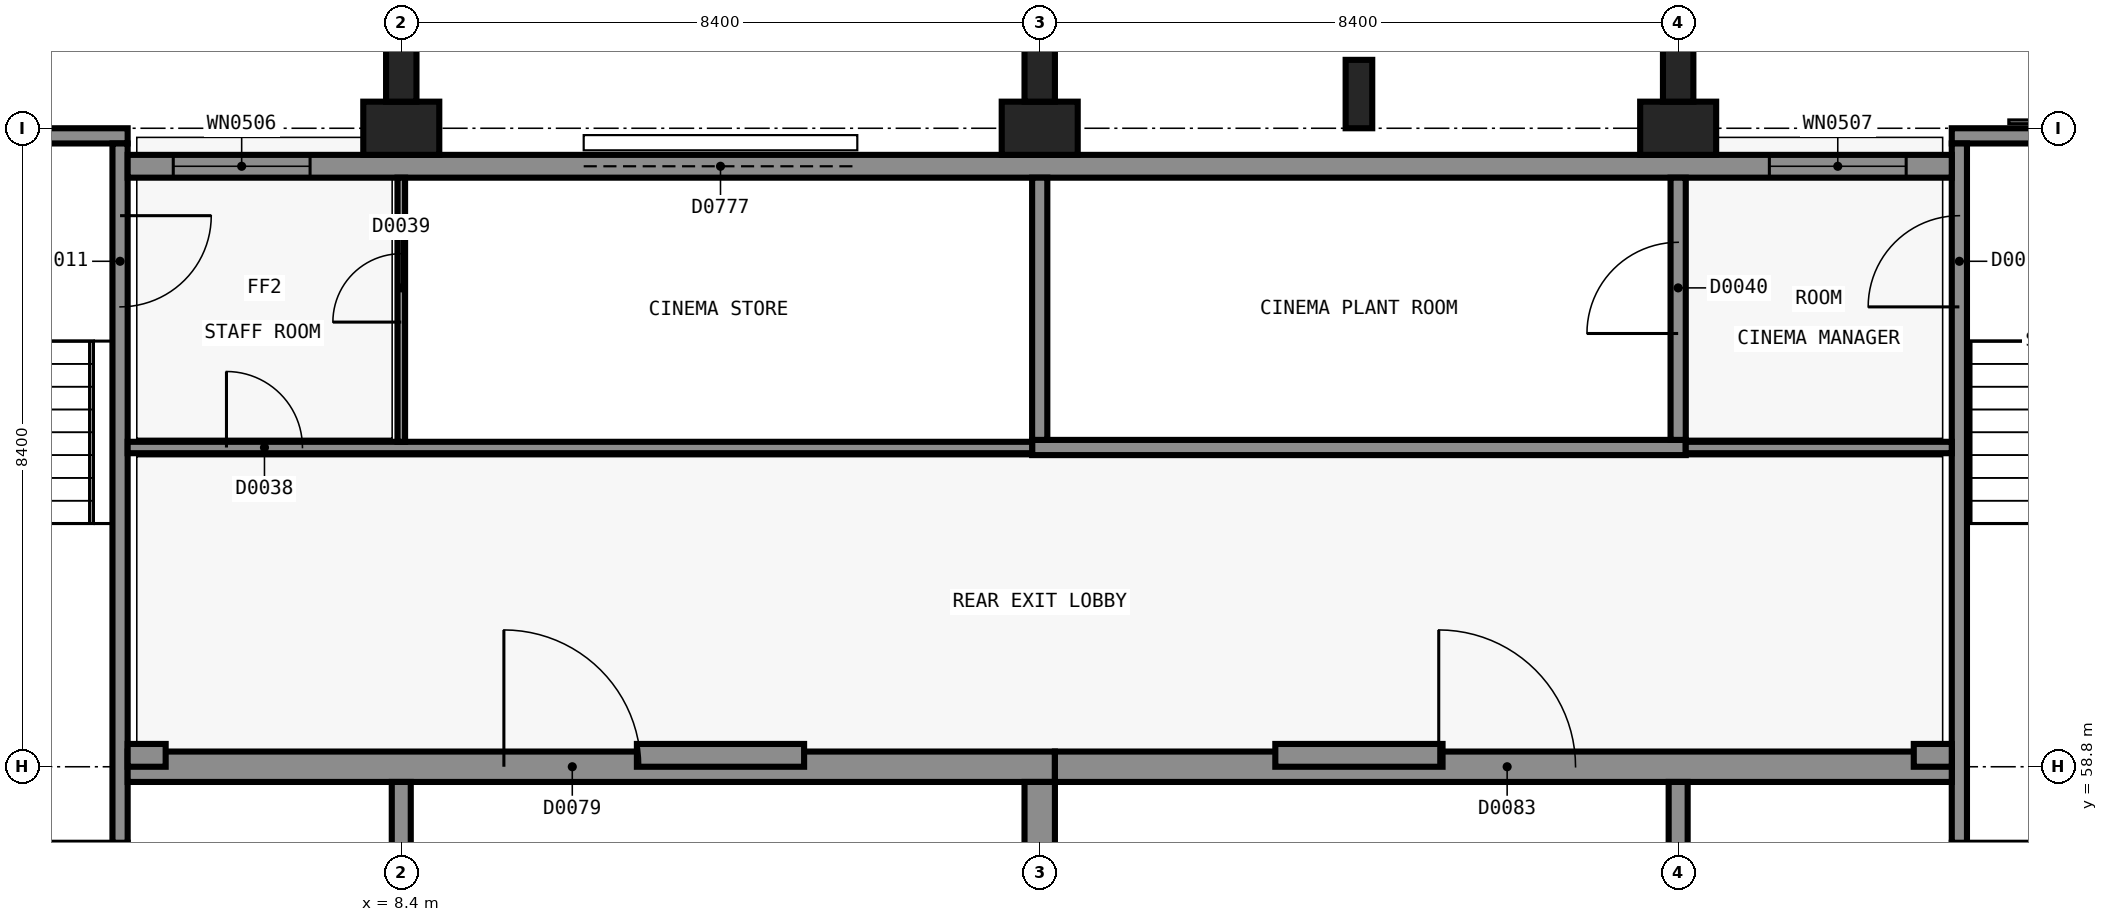
"""IFC4 building model, lengths in metres.
Left out: names, types, materials, properties, quantities, classifications, styles, units other than length and angle.
Written with IfcOpenShell. Run it as: python <this file> out.ifc"""

import sys

from ifc_helpers import new_model, si_unit, direction, frame, frame_2d, origin, origin_2d, place, context, subcontext, project, spatial, polyline, rectangle, outline, extrude, element, fill, save


model = new_model("IFC4")
c1 = context("Model", 3, precision=1e-05, world=origin(), true_north=direction((0.0, 1.0)))
c2 = subcontext(c1, "Body", "Model", "MODEL_VIEW")
j1 = project(units=[si_unit("LENGTHUNIT", "METRE"), si_unit("PLANEANGLEUNIT", "RADIAN")], contexts=[c1])
p1 = place(None, origin())
s1 = spatial("IfcSite", under=j1, at=p1, CompositionType="ELEMENT")
p2 = place(p1, origin())
s2 = spatial("IfcBuilding", under=s1, at=p2, CompositionType="ELEMENT")
p3 = place(p2, origin())
s3 = spatial("IfcBuildingStorey", under=s2, at=p3, CompositionType="ELEMENT", Elevation=0.0)
p4 = place(p3, frame((0.0, 67.1, -0.3), z_axis=(0.0, 0.0, 1.0), x_axis=(1.0, 0.0, 0.0)))
e1 = element("IfcWall", 1, at=p4, inside=s3, PredefinedType="SHEAR", context=c2, shape_type="SweptSolid", body=[
    extrude(rectangle(XDim=4.8, YDim=0.2, at=frame_2d((2.4, 0.0))), origin(), (0.0, 0.0, 1.0), 5.7),
])
p5 = place(p4, frame((1.85, 0.0, 0.0)))
e2 = element("IfcOpeningElement", 2, at=p5, cuts=e1, PredefinedType="OPENING", context=c2, shape_type="SweptSolid", body=[
    extrude(rectangle(XDim=1.1, YDim=2.2, at=frame_2d((0.55, 1.1))), frame((0.0, 0.11, 0.0), z_axis=(0.0, -1.0, 0.0), x_axis=(1.0, 0.0, 0.0)), (0.0, 0.0, 1.0), 0.22),
])
p6 = place(p3, frame((4.7, 67.0, -0.3), z_axis=(0.0, 0.0, 1.0), x_axis=(0.0, -1.0, 0.0)))
e3 = element("IfcWall", 3, at=p6, inside=s3, PredefinedType="SHEAR", context=c2, shape_type="SweptSolid", body=[
    extrude(rectangle(XDim=9.2, YDim=0.2, at=frame_2d((4.6, 0.0))), origin(), (0.0, 0.0, 1.0), 5.7),
])
p7 = place(p6, frame((0.95, 0.0, 0.3)))
e4 = element("IfcOpeningElement", 4, at=p7, cuts=e3, PredefinedType="OPENING", context=c2, shape_type="SweptSolid", body=[
    extrude(rectangle(XDim=1.2, YDim=2.1, at=frame_2d((0.6, 1.05))), frame((0.0, 0.11, 0.0), z_axis=(0.0, -1.0, 0.0), x_axis=(1.0, 0.0, 0.0)), (0.0, 0.0, 1.0), 0.22),
])
p8 = place(p3, frame((28.8, 67.1, -0.3), z_axis=(0.0, 0.0, 1.0), x_axis=(1.0, 0.0, 0.0)))
e5 = element("IfcWall", 5, at=p8, inside=s3, PredefinedType="SHEAR", context=c2, shape_type="SweptSolid", body=[
    extrude(rectangle(XDim=4.8, YDim=0.2, at=frame_2d((2.4, 0.0))), origin(), (0.0, 0.0, 1.0), 5.7),
])
p9 = place(p8, frame((1.85, 0.0, 0.0)))
e6 = element("IfcOpeningElement", 6, at=p9, cuts=e5, PredefinedType="OPENING", context=c2, shape_type="SweptSolid", body=[
    extrude(rectangle(XDim=1.1, YDim=2.2, at=frame_2d((0.55, 1.1))), frame((0.0, 0.11, 0.0), z_axis=(0.0, -1.0, 0.0), x_axis=(1.0, 0.0, 0.0)), (0.0, 0.0, 1.0), 0.22),
])
p10 = place(p3, frame((28.9, 57.8, -0.3), z_axis=(0.0, 0.0, 1.0), x_axis=(0.0, 1.0, 0.0)))
e7 = element("IfcWall", 7, at=p10, inside=s3, PredefinedType="SHEAR", context=c2, shape_type="SweptSolid", body=[
    extrude(rectangle(XDim=9.2, YDim=0.2, at=frame_2d((4.6, 0.0))), origin(), (0.0, 0.0, 1.0), 5.7),
])
p11 = place(p10, frame((7.05, 0.0, 0.3)))
e8 = element("IfcOpeningElement", 8, at=p11, cuts=e7, PredefinedType="OPENING", context=c2, shape_type="SweptSolid", body=[
    extrude(rectangle(XDim=1.2, YDim=2.1, at=frame_2d((0.6, 1.05))), frame((0.0, 0.11, 0.0), z_axis=(0.0, -1.0, 0.0), x_axis=(1.0, 0.0, 0.0)), (0.0, 0.0, 1.0), 0.22),
])
p12 = place(p3, frame((4.8, 58.8, -0.3), z_axis=(0.0, 0.0, 1.0), x_axis=(1.0, 0.0, 0.0)))
e9 = element("IfcWall", 9, at=p12, inside=s3, PredefinedType="SHEAR", context=c2, shape_type="SweptSolid", body=[
    extrude(rectangle(XDim=12.2, YDim=0.4, at=frame_2d((6.1, 0.0))), origin(), (0.0, 0.0, 1.0), 5.7),
])
p13 = place(p12, frame((4.95, 0.0, 0.3)))
e10 = element("IfcOpeningElement", 10, at=p13, cuts=e9, PredefinedType="OPENING", context=c2, shape_type="SweptSolid", body=[
    extrude(rectangle(XDim=1.8, YDim=2.1, at=frame_2d((0.9, 1.05))), frame((0.0, 0.21, 0.0), z_axis=(0.0, -1.0, 0.0), x_axis=(1.0, 0.0, 0.0)), (0.0, 0.0, 1.0), 0.42),
])
p14 = place(p3, frame((16.8, 58.6, -0.3), z_axis=(0.0, 0.0, 1.0), x_axis=(0.0, -1.0, 0.0)))
e11 = element("IfcWall", 11, at=p14, inside=s3, PredefinedType="SHEAR", context=c2, shape_type="SweptSolid", body=[
    extrude(rectangle(XDim=16.4, YDim=0.4, at=frame_2d((8.2, 0.0))), origin(), (0.0, 0.0, 1.0), 5.7),
])
p15 = place(p3, frame((17.0, 58.8, -0.3), z_axis=(0.0, 0.0, 1.0), x_axis=(1.0, 0.0, 0.0)))
e12 = element("IfcWall", 12, at=p15, inside=s3, PredefinedType="SHEAR", context=c2, shape_type="SweptSolid", body=[
    extrude(rectangle(XDim=11.8, YDim=0.4, at=frame_2d((5.9, 0.0))), origin(), (0.0, 0.0, 1.0), 5.7),
])
p16 = place(p15, frame((5.05, 0.0, 0.3)))
e13 = element("IfcOpeningElement", 13, at=p16, cuts=e12, PredefinedType="OPENING", context=c2, shape_type="SweptSolid", body=[
    extrude(rectangle(XDim=1.8, YDim=2.1, at=frame_2d((0.9, 1.05))), frame((0.0, 0.21, 0.0), z_axis=(0.0, -1.0, 0.0), x_axis=(1.0, 0.0, 0.0)), (0.0, 0.0, 1.0), 0.42),
])
for number, where, z_axis, x_axis in (
    (14, (8.4, 43.1, -0.3), (0.0, 0.0, 1.0), (0.0, 1.0, 0.0)),
    (15, (25.2, 43.1, -0.3), (0.0, 0.0, 1.0), (0.0, 1.0, 0.0)),
):
    element("IfcWall", number, at=place(p3, frame(where, z_axis=z_axis, x_axis=x_axis)), inside=s3, PredefinedType="SOLIDWALL", context=c2, shape_type="SweptSolid", body=[
        extrude(outline(polyline([(0.0, 0.0), (15.5, 0.0), (15.5, 2.324), (0.0, 0.154), (0.0, 0.0)])), frame((0.0, 0.125, 0.0), z_axis=(0.0, -1.0, 0.0), x_axis=(1.0, 0.0, 0.0)), (0.0, 0.0, 1.0), 0.25),
    ])
for number, where, z_axis, x_axis in (
    (16, (8.4, 67.2, -0.3), (0.0, 0.0, 1.0), (1.0, 0.0, 0.0)),
    (17, (16.8, 67.2, -0.3), (0.0, 0.0, 1.0), (1.0, 0.0, 0.0)),
    (18, (25.2, 67.2, -0.3), (0.0, 0.0, 1.0), (1.0, 0.0, 0.0)),
):
    element("IfcColumn", number, at=place(p3, frame(where, z_axis=z_axis, x_axis=x_axis)), inside=s3, PredefinedType="COLUMN", context=c2, shape_type="SweptSolid", body=[
        extrude(rectangle(XDim=1.0, YDim=0.7, at=origin_2d()), origin(), (0.0, 0.0, 1.0), 5.7),
    ])
p17 = place(p3, frame((5.3, 58.95, -1.2), z_axis=(0.0, 0.0, 1.0), x_axis=(-1.0, 0.0, 0.0)))
e19 = element("IfcWall", 19, at=p17, inside=s3, PredefinedType="SOLIDWALL", context=c2, shape_type="SweptSolid", body=[
    extrude(rectangle(XDim=0.5, YDim=0.3, at=frame_2d((0.25, 0.0))), origin(), (0.0, 0.0, 1.0), 0.9),
])
p18 = place(p3, frame((13.7, 58.95, -1.2), z_axis=(0.0, 0.0, 1.0), x_axis=(-1.0, 0.0, 0.0)))
e20 = element("IfcWall", 20, at=p18, inside=s3, PredefinedType="SOLIDWALL", context=c2, shape_type="SweptSolid", body=[
    extrude(rectangle(XDim=2.2, YDim=0.3, at=frame_2d((1.1, 0.0))), origin(), (0.0, 0.0, 1.0), 0.9),
])
p19 = place(p3, frame((22.1, 58.95, -1.2), z_axis=(0.0, 0.0, 1.0), x_axis=(-1.0, 0.0, 0.0)))
e21 = element("IfcWall", 21, at=p19, inside=s3, PredefinedType="SOLIDWALL", context=c2, shape_type="SweptSolid", body=[
    extrude(rectangle(XDim=2.2, YDim=0.3, at=frame_2d((1.1, 0.0))), origin(), (0.0, 0.0, 1.0), 0.9),
])
p20 = place(p3, frame((28.8, 58.95, -1.2), z_axis=(0.0, 0.0, 1.0), x_axis=(-1.0, 0.0, 0.0)))
e22 = element("IfcWall", 22, at=p20, inside=s3, PredefinedType="SOLIDWALL", context=c2, shape_type="SweptSolid", body=[
    extrude(rectangle(XDim=0.5, YDim=0.3, at=frame_2d((0.25, 0.0))), origin(), (0.0, 0.0, 1.0), 0.9),
])
p21 = place(p3, frame((4.8, 66.7, 0.0), z_axis=(0.0, 0.0, 1.0), x_axis=(1.0, 0.0, 0.0)))
e23 = element("IfcWall", 23, at=p21, inside=s3, PredefinedType="SOLIDWALL", context=c2, shape_type="SweptSolid", body=[
    extrude(rectangle(XDim=24.0, YDim=0.3, at=frame_2d((12.0, 0.0))), origin(), (0.0, 0.0, 1.0), 5.1),
])
p22 = place(p21, frame((6.0, 0.0, 0.0)))
e24 = element("IfcOpeningElement", 24, at=p22, cuts=e23, PredefinedType="OPENING", context=c2, shape_type="SweptSolid", body=[
    extrude(rectangle(XDim=3.6, YDim=2.4, at=frame_2d((1.8, 1.2))), frame((0.0, 0.16, 0.0), z_axis=(0.0, -1.0, 0.0), x_axis=(1.0, 0.0, 0.0)), (0.0, 0.0, 1.0), 0.32),
])
p23 = place(p21, frame((0.6, 0.0, 0.9)))
e25 = element("IfcOpeningElement", 25, at=p23, cuts=e23, PredefinedType="OPENING", context=c2, shape_type="SweptSolid", body=[
    extrude(rectangle(XDim=1.8, YDim=1.5, at=frame_2d((0.9, 0.75))), frame((0.0, 0.16, 0.0), z_axis=(0.0, -1.0, 0.0), x_axis=(1.0, 0.0, 0.0)), (0.0, 0.0, 1.0), 0.32),
])
p24 = place(p21, frame((21.6, 0.0, 0.9)))
e26 = element("IfcOpeningElement", 26, at=p24, cuts=e23, PredefinedType="OPENING", context=c2, shape_type="SweptSolid", body=[
    extrude(rectangle(XDim=1.8, YDim=1.5, at=frame_2d((0.9, 0.75))), frame((0.0, 0.16, 0.0), z_axis=(0.0, -1.0, 0.0), x_axis=(1.0, 0.0, 0.0)), (0.0, 0.0, 1.0), 0.32),
])
for number, where, z_axis, x_axis in (
    (27, (8.4, 68.15, -0.3), (0.0, 0.0, 1.0), (1.0, 0.0, 0.0)),
    (28, (16.8, 68.15, -0.3), (0.0, 0.0, 1.0), (1.0, 0.0, 0.0)),
):
    element("IfcColumn", number, at=place(p3, frame(where, z_axis=z_axis, x_axis=x_axis)), inside=s3, PredefinedType="PILASTER", context=c2, shape_type="SweptSolid", body=[
        extrude(rectangle(XDim=0.4, YDim=1.2, at=origin_2d()), origin(), (0.0, 0.0, 1.0), 5.7),
    ])
p25 = place(p3, frame((21.0, 67.65, -0.3), z_axis=(0.0, 0.0, 1.0), x_axis=(1.0, 0.0, 0.0)))
e29 = element("IfcColumn", 29, at=p25, inside=s3, PredefinedType="PILASTER", context=c2, shape_type="SweptSolid", body=[
    extrude(rectangle(XDim=0.35, YDim=0.9, at=origin_2d()), origin(), (0.0, 0.0, 1.0), 5.7),
])
p26 = place(p3, frame((25.2, 68.15, -0.3), z_axis=(0.0, 0.0, 1.0), x_axis=(1.0, 0.0, 0.0)))
e30 = element("IfcColumn", 30, at=p26, inside=s3, PredefinedType="PILASTER", context=c2, shape_type="SweptSolid", body=[
    extrude(rectangle(XDim=0.4, YDim=1.2, at=origin_2d()), origin(), (0.0, 0.0, 1.0), 5.7),
])
p27 = place(p3, frame((16.7, 63.0, 0.0), z_axis=(0.0, 0.0, 1.0), x_axis=(1.0, 0.0, 0.0)))
e31 = element("IfcWall", 31, at=p27, inside=s3, PredefinedType="SOLIDWALL", context=c2, shape_type="SweptSolid", body=[
    extrude(rectangle(XDim=8.6, YDim=0.2, at=frame_2d((4.3, 0.0))), origin(), (0.0, 0.0, 1.0), 4.4),
])
p28 = place(p3, frame((16.8, 63.1, 0.0), z_axis=(0.0, 0.0, 1.0), x_axis=(0.0, 1.0, 0.0)))
e32 = element("IfcWall", 32, at=p28, inside=s3, PredefinedType="SOLIDWALL", context=c2, shape_type="SweptSolid", body=[
    extrude(rectangle(XDim=3.45, YDim=0.2, at=frame_2d((1.725, 0.0))), origin(), (0.0, 0.0, 1.0), 4.4),
])
p29 = place(p3, frame((16.8, 66.85, 0.0), z_axis=(0.0, 0.0, 1.0), x_axis=(0.0, 1.0, 0.0)))
e33 = element("IfcWall", 33, at=p29, inside=s3, PredefinedType="SOLIDWALL", context=c2, shape_type="SweptSolid", body=[
    extrude(rectangle(XDim=0.45, YDim=0.2, at=frame_2d((0.225, 0.0))), origin(), (0.0, 0.0, 1.0), 4.4),
])
p30 = place(p3, frame((25.2, 63.1, 0.0), z_axis=(0.0, 0.0, 1.0), x_axis=(0.0, 1.0, 0.0)))
e34 = element("IfcWall", 34, at=p30, inside=s3, PredefinedType="SOLIDWALL", context=c2, shape_type="SweptSolid", body=[
    extrude(rectangle(XDim=3.45, YDim=0.2, at=frame_2d((1.725, 0.0))), origin(), (0.0, 0.0, 1.0), 4.4),
])
p31 = place(p30, frame((1.4, 0.0, 0.0)))
e35 = element("IfcOpeningElement", 35, at=p31, cuts=e34, PredefinedType="OPENING", context=c2, shape_type="SweptSolid", body=[
    extrude(rectangle(XDim=1.2, YDim=2.1, at=frame_2d((0.6, 1.05))), frame((0.0, 0.11, 0.0), z_axis=(0.0, -1.0, 0.0), x_axis=(1.0, 0.0, 0.0)), (0.0, 0.0, 1.0), 0.22),
])
p32 = place(p3, frame((25.2, 66.85, 0.0), z_axis=(0.0, 0.0, 1.0), x_axis=(0.0, 1.0, 0.0)))
e36 = element("IfcWall", 36, at=p32, inside=s3, PredefinedType="SOLIDWALL", context=c2, shape_type="SweptSolid", body=[
    extrude(rectangle(XDim=0.45, YDim=0.2, at=frame_2d((0.225, 0.0))), origin(), (0.0, 0.0, 1.0), 4.4),
])
p33 = place(p3, frame((4.8, 63.0, 0.0), z_axis=(0.0, 0.0, 1.0), x_axis=(1.0, 0.0, 0.0)))
e37 = element("IfcWall", 37, at=p33, inside=s3, PredefinedType="PARTITIONING", context=c2, shape_type="SweptSolid", body=[
    extrude(rectangle(XDim=11.9, YDim=0.15, at=frame_2d((5.95, 0.0))), origin(), (0.0, 0.0, 1.0), 4.4),
])
p34 = place(p33, frame((1.3, 0.0, 0.0)))
e38 = element("IfcOpeningElement", 38, at=p34, cuts=e37, PredefinedType="OPENING", context=c2, shape_type="SweptSolid", body=[
    extrude(rectangle(XDim=1.0, YDim=2.1, at=frame_2d((0.5, 1.05))), frame((0.0, 0.085, 0.0), z_axis=(0.0, -1.0, 0.0), x_axis=(1.0, 0.0, 0.0)), (0.0, 0.0, 1.0), 0.17),
])
p35 = place(p3, frame((25.3, 63.0, 0.0), z_axis=(0.0, 0.0, 1.0), x_axis=(1.0, 0.0, 0.0)))
e39 = element("IfcWall", 39, at=p35, inside=s3, PredefinedType="PARTITIONING", context=c2, shape_type="SweptSolid", body=[
    extrude(rectangle(XDim=3.5, YDim=0.15, at=frame_2d((1.75, 0.0))), origin(), (0.0, 0.0, 1.0), 4.4),
])
p36 = place(p3, frame((8.4, 63.075, 0.0), z_axis=(0.0, 0.0, 1.0), x_axis=(0.0, 1.0, 0.0)))
e40 = element("IfcWall", 40, at=p36, inside=s3, PredefinedType="PARTITIONING", context=c2, shape_type="SweptSolid", body=[
    extrude(rectangle(XDim=3.475, YDim=0.1, at=frame_2d((1.738, 0.0))), origin(), (0.0, 0.0, 1.0), 4.4),
])
p37 = place(p36, frame((1.575, 0.0, 0.0)))
e41 = element("IfcOpeningElement", 41, at=p37, cuts=e40, PredefinedType="OPENING", context=c2, shape_type="SweptSolid", body=[
    extrude(rectangle(XDim=0.9, YDim=2.1, at=frame_2d((0.45, 1.05))), frame((0.0, 0.06, 0.0), z_axis=(0.0, -1.0, 0.0), x_axis=(1.0, 0.0, 0.0)), (0.0, 0.0, 1.0), 0.12),
])
p38 = place(p3, frame((8.4, 66.85, 0.0), z_axis=(0.0, 0.0, 1.0), x_axis=(0.0, 1.0, 0.0)))
e42 = element("IfcWall", 42, at=p38, inside=s3, PredefinedType="PARTITIONING", context=c2, shape_type="SweptSolid", body=[
    extrude(rectangle(XDim=0.4, YDim=0.1, at=frame_2d((0.2, 0.0))), origin(), (0.0, 0.0, 1.0), 4.4),
])
p39 = place(p22, origin())
e43 = element("IfcDoor", 43, at=p39, inside=s3, OperationType="SINGLE_SWING_LEFT", PredefinedType="GATE", context=c2, shape_type="SweptSolid", body=[
    extrude(rectangle(XDim=3.6, YDim=2.4, at=frame_2d((1.8, 1.2))), frame((0.0, 0.025, 0.0), z_axis=(0.0, -1.0, 0.0), x_axis=(1.0, 0.0, 0.0)), (0.0, 0.0, 1.0), 0.05),
])
fill(e24, e43)
p40 = place(p23, origin())
e44 = element("IfcWindow", 44, at=p40, inside=s3, PartitioningType="SINGLE_PANEL", PredefinedType="WINDOW", context=c2, shape_type="SweptSolid", body=[
    extrude(rectangle(XDim=1.8, YDim=1.5, at=frame_2d((0.9, 0.75))), frame((0.0, 0.03, 0.0), z_axis=(0.0, -1.0, 0.0), x_axis=(1.0, 0.0, 0.0)), (0.0, 0.0, 1.0), 0.06),
])
fill(e25, e44)
p41 = place(p24, origin())
e45 = element("IfcWindow", 45, at=p41, inside=s3, PartitioningType="SINGLE_PANEL", PredefinedType="WINDOW", context=c2, shape_type="SweptSolid", body=[
    extrude(rectangle(XDim=1.8, YDim=1.5, at=frame_2d((0.9, 0.75))), frame((0.0, 0.03, 0.0), z_axis=(0.0, -1.0, 0.0), x_axis=(1.0, 0.0, 0.0)), (0.0, 0.0, 1.0), 0.06),
])
fill(e26, e45)
p42 = place(p7, origin())
e46 = element("IfcDoor", 46, at=p42, inside=s3, OperationType="SINGLE_SWING_RIGHT", PredefinedType="DOOR", context=c2, shape_type="SweptSolid", body=[
    extrude(rectangle(XDim=1.2, YDim=2.1, at=frame_2d((0.6, 1.05))), frame((0.0, 0.025, 0.0), z_axis=(0.0, -1.0, 0.0), x_axis=(1.0, 0.0, 0.0)), (0.0, 0.0, 1.0), 0.05),
])
fill(e4, e46)
p43 = place(p11, origin())
e47 = element("IfcDoor", 47, at=p43, inside=s3, OperationType="SINGLE_SWING_RIGHT", PredefinedType="DOOR", context=c2, shape_type="SweptSolid", body=[
    extrude(rectangle(XDim=1.2, YDim=2.1, at=frame_2d((0.6, 1.05))), frame((0.0, 0.025, 0.0), z_axis=(0.0, -1.0, 0.0), x_axis=(1.0, 0.0, 0.0)), (0.0, 0.0, 1.0), 0.05),
])
fill(e8, e47)
p44 = place(p34, origin())
e48 = element("IfcDoor", 48, at=p44, inside=s3, OperationType="SINGLE_SWING_LEFT", PredefinedType="DOOR", context=c2, shape_type="SweptSolid", body=[
    extrude(rectangle(XDim=1.0, YDim=2.1, at=frame_2d((0.5, 1.05))), frame((0.0, 0.025, 0.0), z_axis=(0.0, -1.0, 0.0), x_axis=(1.0, 0.0, 0.0)), (0.0, 0.0, 1.0), 0.05),
])
fill(e38, e48)
p45 = place(p37, origin())
e49 = element("IfcDoor", 49, at=p45, inside=s3, OperationType="SINGLE_SWING_LEFT", PredefinedType="DOOR", context=c2, shape_type="SweptSolid", body=[
    extrude(rectangle(XDim=0.9, YDim=2.1, at=frame_2d((0.45, 1.05))), frame((0.0, 0.025, 0.0), z_axis=(0.0, -1.0, 0.0), x_axis=(1.0, 0.0, 0.0)), (0.0, 0.0, 1.0), 0.05),
])
fill(e41, e49)
p46 = place(p31, origin())
e50 = element("IfcDoor", 50, at=p46, inside=s3, OperationType="SINGLE_SWING_LEFT", PredefinedType="DOOR", context=c2, shape_type="SweptSolid", body=[
    extrude(rectangle(XDim=1.2, YDim=2.1, at=frame_2d((0.6, 1.05))), frame((0.0, 0.025, 0.0), z_axis=(0.0, -1.0, 0.0), x_axis=(1.0, 0.0, 0.0)), (0.0, 0.0, 1.0), 0.05),
])
fill(e35, e50)
p47 = place(p13, origin())
e51 = element("IfcDoor", 51, at=p47, inside=s3, OperationType="DOUBLE_DOOR_SINGLE_SWING", PredefinedType="DOOR", context=c2, shape_type="SweptSolid", body=[
    extrude(rectangle(XDim=1.8, YDim=2.1, at=frame_2d((0.9, 1.05))), frame((0.0, 0.025, 0.0), z_axis=(0.0, -1.0, 0.0), x_axis=(1.0, 0.0, 0.0)), (0.0, 0.0, 1.0), 0.05),
])
fill(e10, e51)
p48 = place(p16, origin())
e52 = element("IfcDoor", 52, at=p48, inside=s3, OperationType="DOUBLE_DOOR_SINGLE_SWING", PredefinedType="DOOR", context=c2, shape_type="SweptSolid", body=[
    extrude(rectangle(XDim=1.8, YDim=2.1, at=frame_2d((0.9, 1.05))), frame((0.0, 0.025, 0.0), z_axis=(0.0, -1.0, 0.0), x_axis=(1.0, 0.0, 0.0)), (0.0, 0.0, 1.0), 0.05),
])
fill(e13, e52)
save(model, sys.argv[1])
